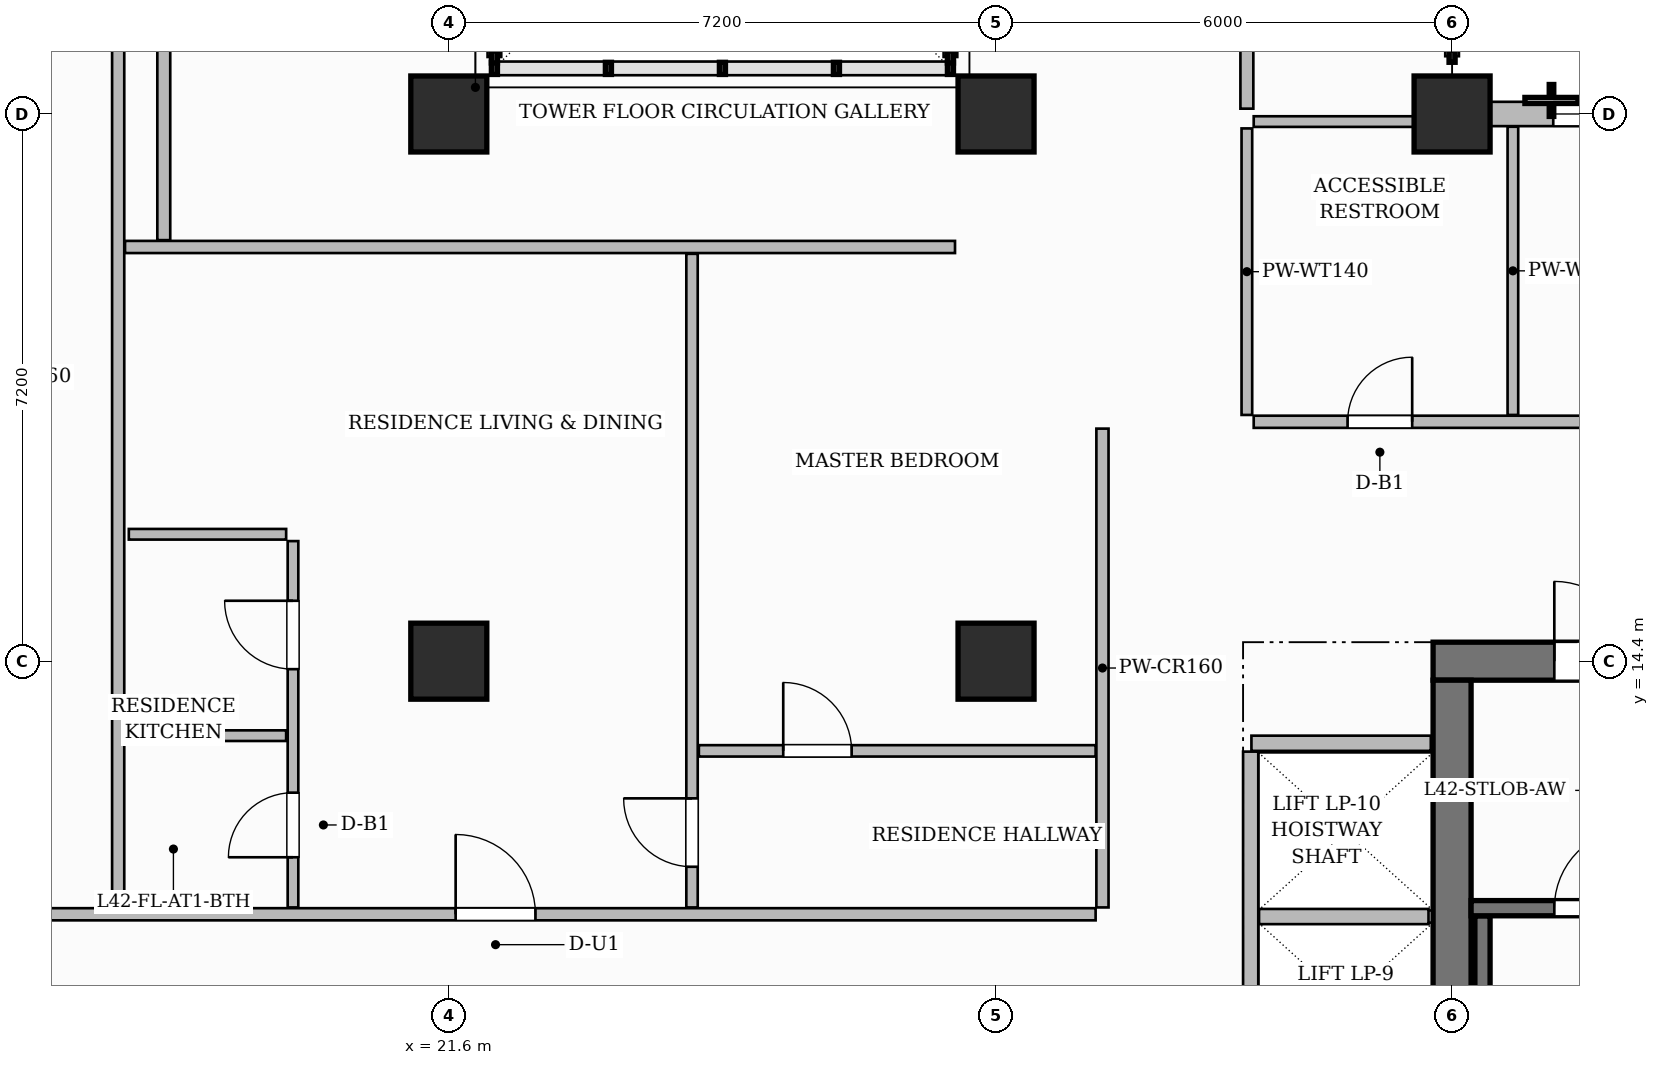
"""IFC4 building model, lengths in metres.
Left out: names, types, materials, properties, quantities, classifications, styles, units other than length and angle.
Written with IfcOpenShell. Run it as: python <this file> out.ifc"""

import sys

from ifc_helpers import new_model, si_unit, direction, frame, frame_2d, origin, origin_2d, place, context, subcontext, project, spatial, rectangle, extrude, source, transform, mapped, element, fill, save


model = new_model("IFC4")
c1 = context("Model", 3, precision=1e-05, world=origin(), true_north=direction((0.0, 1.0)))
c2 = subcontext(c1, "Body", "Model", "MODEL_VIEW")
j1 = project(units=[si_unit("LENGTHUNIT", "METRE"), si_unit("PLANEANGLEUNIT", "RADIAN")], contexts=[c1])
p1 = place(None, origin())
s1 = spatial("IfcSite", under=j1, at=p1, CompositionType="ELEMENT")
p2 = place(p1, origin())
s2 = spatial("IfcBuilding", under=s1, at=p2, CompositionType="ELEMENT")
p3 = place(p2, frame((0.0, 0.0, 169.55)))
s3 = spatial("IfcBuildingStorey", under=s2, at=p3, CompositionType="ELEMENT", Elevation=169.55)
p4 = place(p3, frame((34.55, 14.4, 0.0), z_axis=(0.0, 0.0, 1.0), x_axis=(1.0, 0.0, 0.0)))
e1 = element("IfcWall", 1, at=p4, inside=s3, PredefinedType="SHEAR", context=c2, shape_type="SweptSolid", body=[
    extrude(rectangle(XDim=15.5, YDim=0.5, at=frame_2d((7.75, 0.0))), origin(), (0.0, 0.0, 1.0), 3.85),
])
p5 = place(p4, frame((5.38, 0.0, 0.0)))
e2 = element("IfcOpeningElement", 2, at=p5, cuts=e1, PredefinedType="OPENING", context=c2, shape_type="SweptSolid", body=[
    extrude(rectangle(XDim=1.5, YDim=2.2, at=frame_2d((0.75, 1.1))), frame((0.0, 0.26, 0.0), z_axis=(0.0, -1.0, 0.0), x_axis=(1.0, 0.0, 0.0)), (0.0, 0.0, 1.0), 0.52),
])
p6 = place(p4, frame((1.595, 0.0, 0.0)))
e3 = element("IfcOpeningElement", 3, at=p6, cuts=e1, PredefinedType="OPENING", context=c2, shape_type="SweptSolid", body=[
    extrude(rectangle(XDim=1.05, YDim=2.15, at=frame_2d((0.525, 1.075))), frame((0.0, 0.26, 0.0), z_axis=(0.0, -1.0, 0.0), x_axis=(1.0, 0.0, 0.0)), (0.0, 0.0, 1.0), 0.52),
])
p7 = place(p4, frame((11.225, 0.0, 0.0)))
e4 = element("IfcOpeningElement", 4, at=p7, cuts=e1, PredefinedType="OPENING", context=c2, shape_type="SweptSolid", body=[
    extrude(rectangle(XDim=1.05, YDim=2.15, at=frame_2d((0.525, 1.075))), frame((0.0, 0.26, 0.0), z_axis=(0.0, -1.0, 0.0), x_axis=(1.0, 0.0, 0.0)), (0.0, 0.0, 1.0), 0.52),
])
p8 = place(p3, frame((34.8, 3.85, 0.0), z_axis=(0.0, 0.0, 1.0), x_axis=(0.0, 1.0, 0.0)))
e5 = element("IfcWall", 5, at=p8, inside=s3, PredefinedType="SHEAR", context=c2, shape_type="SweptSolid", body=[
    extrude(rectangle(XDim=10.3, YDim=0.5, at=frame_2d((5.15, 0.0))), origin(), (0.0, 0.0, 1.0), 3.85),
])
m1 = source(origin(), c2, "Body", "SweptSolid", [
    extrude(rectangle(XDim=1.0, YDim=1.0, at=origin_2d()), origin(), (0.0, 0.0, 1.0), 3.85),
])
for number, where, z_axis, x_axis in (
    (6, (21.6, 14.4, 0.0), (0.0, 0.0, 1.0), (1.0, 0.0, 0.0)),
    (7, (21.6, 21.6, 0.0), (0.0, 0.0, 1.0), (1.0, 0.0, 0.0)),
    (8, (28.8, 14.4, 0.0), (0.0, 0.0, 1.0), (1.0, 0.0, 0.0)),
    (9, (28.8, 21.6, 0.0), (0.0, 0.0, 1.0), (1.0, 0.0, 0.0)),
    (10, (34.8, 21.6, 0.0), (0.0, 0.0, 1.0), (1.0, 0.0, 0.0)),
):
    element("IfcColumn", number, at=place(p3, frame(where, z_axis=z_axis, x_axis=x_axis)), inside=s3, PredefinedType="COLUMN", context=c2, shape_type="MappedRepresentation", body=[
        mapped(m1, transform((0.0, 0.0, 0.0), scale=1.0)),
    ])
p9 = place(p3, frame((35.2, 4.1, 0.0), z_axis=(0.0, 0.0, 1.0), x_axis=(0.0, 1.0, 0.0)))
e11 = element("IfcWall", 11, at=p9, inside=s3, PredefinedType="SHEAR", context=c2, shape_type="SweptSolid", body=[
    extrude(rectangle(XDim=6.95, YDim=0.2, at=frame_2d((3.475, 0.0))), origin(), (0.0, 0.0, 1.0), 3.85),
])
p10 = place(p3, frame((35.05, 11.15, 0.0), z_axis=(0.0, 0.0, 1.0), x_axis=(1.0, 0.0, 0.0)))
e12 = element("IfcWall", 12, at=p10, inside=s3, PredefinedType="SHEAR", context=c2, shape_type="SweptSolid", body=[
    extrude(rectangle(XDim=3.19, YDim=0.2, at=frame_2d((1.595, 0.0))), origin(), (0.0, 0.0, 1.0), 3.85),
])
p11 = place(p10, frame((1.095, 0.0, 0.0)))
e13 = element("IfcOpeningElement", 13, at=p11, cuts=e12, PredefinedType="OPENING", context=c2, shape_type="SweptSolid", body=[
    extrude(rectangle(XDim=1.05, YDim=2.2, at=frame_2d((0.525, 1.1))), frame((0.0, 0.11, 0.0), z_axis=(0.0, -1.0, 0.0), x_axis=(1.0, 0.0, 0.0)), (0.0, 0.0, 1.0), 0.22),
])
p12 = place(p3, frame((32.16, 13.32, 0.0), z_axis=(0.0, 0.0, 1.0), x_axis=(1.0, 0.0, 0.0)))
e14 = element("IfcWall", 14, at=p12, inside=s3, PredefinedType="PARTITIONING", context=c2, shape_type="SweptSolid", body=[
    extrude(rectangle(XDim=2.36, YDim=0.2, at=frame_2d((1.18, 0.0))), origin(), (0.0, 0.0, 1.0), 3.6),
])
p13 = place(p3, frame((32.15, 4.39, 0.0), z_axis=(0.0, 0.0, 1.0), x_axis=(0.0, 1.0, 0.0)))
e15 = element("IfcWall", 15, at=p13, inside=s3, PredefinedType="PARTITIONING", context=c2, shape_type="SweptSolid", body=[
    extrude(rectangle(XDim=8.82, YDim=0.2, at=frame_2d((4.41, 0.0))), origin(), (0.0, 0.0, 1.0), 3.6),
])
p14 = place(p3, frame((32.26, 11.04, 0.0), z_axis=(0.0, 0.0, 1.0), x_axis=(1.0, 0.0, 0.0)))
e16 = element("IfcWall", 16, at=p14, inside=s3, PredefinedType="PARTITIONING", context=c2, shape_type="SweptSolid", body=[
    extrude(rectangle(XDim=2.23, YDim=0.2, at=frame_2d((1.115, 0.0))), origin(), (0.0, 0.0, 1.0), 3.6),
])
p15 = place(p3, frame((14.568, 11.07, 0.0), z_axis=(0.0, 0.0, 1.0), x_axis=(1.0, 0.0, 0.0)))
e17 = element("IfcWall", 17, at=p15, inside=s3, PredefinedType="PARTITIONING", context=c2, shape_type="SweptSolid", body=[
    extrude(rectangle(XDim=15.542, YDim=0.16, at=frame_2d((7.771, 0.0))), origin(), (0.0, 0.0, 1.0), 3.6),
])
p16 = place(p15, frame((7.122, 0.0, 0.0)))
e18 = element("IfcOpeningElement", 18, at=p16, cuts=e17, PredefinedType="OPENING", context=c2, shape_type="SweptSolid", body=[
    extrude(rectangle(XDim=1.05, YDim=2.25, at=frame_2d((0.525, 1.125))), frame((0.0, 0.09, 0.0), z_axis=(0.0, -1.0, 0.0), x_axis=(1.0, 0.0, 0.0)), (0.0, 0.0, 1.0), 0.18),
])
p17 = place(p3, frame((30.2, 11.16, 0.0), z_axis=(0.0, 0.0, 1.0), x_axis=(0.0, 1.0, 0.0)))
e19 = element("IfcWall", 19, at=p17, inside=s3, PredefinedType="PARTITIONING", context=c2, shape_type="SweptSolid", body=[
    extrude(rectangle(XDim=6.3, YDim=0.16, at=frame_2d((3.15, 0.0))), origin(), (0.0, 0.0, 1.0), 3.6),
])
p18 = place(p3, frame((32.19, 17.55, 0.0), z_axis=(0.0, 0.0, 1.0), x_axis=(1.0, 0.0, 0.0)))
e20 = element("IfcWall", 20, at=p18, inside=s3, PredefinedType="PARTITIONING", context=c2, shape_type="SweptSolid", body=[
    extrude(rectangle(XDim=17.47, YDim=0.16, at=frame_2d((8.735, 0.0))), origin(), (0.0, 0.0, 1.0), 3.6),
])
p19 = place(p18, frame((1.235, 0.0, 0.0)))
e21 = element("IfcOpeningElement", 21, at=p19, cuts=e20, PredefinedType="OPENING", context=c2, shape_type="SweptSolid", body=[
    extrude(rectangle(XDim=0.85, YDim=2.1, at=frame_2d((0.425, 1.05))), frame((0.0, 0.09, 0.0), z_axis=(0.0, -1.0, 0.0), x_axis=(1.0, 0.0, 0.0)), (0.0, 0.0, 1.0), 0.18),
])
p20 = place(p18, frame((6.61, 0.0, 0.0)))
e22 = element("IfcOpeningElement", 22, at=p20, cuts=e20, PredefinedType="OPENING", context=c2, shape_type="SweptSolid", body=[
    extrude(rectangle(XDim=1.4, YDim=2.35, at=frame_2d((0.7, 1.175))), frame((0.0, 0.09, 0.0), z_axis=(0.0, -1.0, 0.0), x_axis=(1.0, 0.0, 0.0)), (0.0, 0.0, 1.0), 0.18),
])
p21 = place(p18, frame((13.885, 0.0, 0.0)))
e23 = element("IfcOpeningElement", 23, at=p21, cuts=e20, PredefinedType="OPENING", context=c2, shape_type="SweptSolid", body=[
    extrude(rectangle(XDim=0.95, YDim=2.15, at=frame_2d((0.475, 1.075))), frame((0.0, 0.09, 0.0), z_axis=(0.0, -1.0, 0.0), x_axis=(1.0, 0.0, 0.0)), (0.0, 0.0, 1.0), 0.18),
])
p22 = place(p3, frame((32.1, 17.64, 0.0), z_axis=(0.0, 0.0, 1.0), x_axis=(0.0, 1.0, 0.0)))
e24 = element("IfcWall", 24, at=p22, inside=s3, PredefinedType="PARTITIONING", context=c2, shape_type="SweptSolid", body=[
    extrude(rectangle(XDim=3.77, YDim=0.14, at=frame_2d((1.885, 0.0))), origin(), (0.0, 0.0, 1.0), 3.6),
])
p23 = place(p3, frame((35.6, 17.64, 0.0), z_axis=(0.0, 0.0, 1.0), x_axis=(0.0, 1.0, 0.0)))
e25 = element("IfcWall", 25, at=p23, inside=s3, PredefinedType="PARTITIONING", context=c2, shape_type="SweptSolid", body=[
    extrude(rectangle(XDim=3.792, YDim=0.14, at=frame_2d((1.896, 0.0))), origin(), (0.0, 0.0, 1.0), 3.6),
])
p24 = place(p3, frame((17.25, 11.16, 0.0), z_axis=(0.0, 0.0, 1.0), x_axis=(0.0, 1.0, 0.0)))
e26 = element("IfcWall", 26, at=p24, inside=s3, PredefinedType="PARTITIONING", context=c2, shape_type="SweptSolid", body=[
    extrude(rectangle(XDim=13.95, YDim=0.16, at=frame_2d((6.975, 0.0))), origin(), (0.0, 0.0, 1.0), 3.6),
])
p25 = place(p3, frame((17.85, 19.94, 0.0), z_axis=(0.0, 0.0, 1.0), x_axis=(0.0, 1.0, 0.0)))
e27 = element("IfcWall", 27, at=p25, inside=s3, PredefinedType="PARTITIONING", context=c2, shape_type="SweptSolid", body=[
    extrude(rectangle(XDim=5.22, YDim=0.17, at=frame_2d((2.61, 0.0))), origin(), (0.0, 0.0, 1.0), 3.285),
])
p26 = place(p3, frame((17.34, 19.85, 0.0), z_axis=(0.0, 0.0, 1.0), x_axis=(1.0, 0.0, 0.0)))
e28 = element("IfcWall", 28, at=p26, inside=s3, PredefinedType="PARTITIONING", context=c2, shape_type="SweptSolid", body=[
    extrude(rectangle(XDim=10.92, YDim=0.16, at=frame_2d((5.46, 0.0))), origin(), (0.0, 0.0, 1.0), 3.6),
])
p27 = place(p3, frame((32.19, 21.5, 0.0), z_axis=(0.0, 0.0, 1.0), x_axis=(1.0, 0.0, 0.0)))
e29 = element("IfcWall", 29, at=p27, inside=s3, PredefinedType="PARTITIONING", context=c2, shape_type="SweptSolid", body=[
    extrude(rectangle(XDim=2.42, YDim=0.14, at=frame_2d((1.21, 0.0))), origin(), (0.0, 0.0, 1.0), 3.085),
])
p28 = place(p3, frame((32.1, 21.67, 0.0), z_axis=(0.0, 0.0, 1.0), x_axis=(0.0, 1.0, 0.0)))
e30 = element("IfcWall", 30, at=p28, inside=s3, PredefinedType="PARTITIONING", context=c2, shape_type="SweptSolid", body=[
    extrude(rectangle(XDim=10.702, YDim=0.17, at=frame_2d((5.351, 0.0))), origin(), (0.0, 0.0, 1.0), 3.6),
])
p29 = place(p28, frame((4.43, 0.0, 0.0)))
e31 = element("IfcOpeningElement", 31, at=p29, cuts=e30, PredefinedType="OPENING", context=c2, shape_type="SweptSolid", body=[
    extrude(rectangle(XDim=1.4, YDim=2.35, at=frame_2d((0.7, 1.175))), frame((0.0, 0.095, 0.0), z_axis=(0.0, -1.0, 0.0), x_axis=(1.0, 0.0, 0.0)), (0.0, 0.0, 1.0), 0.19),
])
p30 = place(p3, frame((19.55, 11.16, 0.0), z_axis=(0.0, 0.0, 1.0), x_axis=(0.0, 1.0, 0.0)))
e32 = element("IfcWall", 32, at=p30, inside=s3, PredefinedType="PARTITIONING", context=c2, shape_type="SweptSolid", body=[
    extrude(rectangle(XDim=4.82, YDim=0.14, at=frame_2d((2.41, 0.0))), origin(), (0.0, 0.0, 1.0), 3.6),
])
p31 = place(p30, frame((0.66, 0.0, 0.0)))
e33 = element("IfcOpeningElement", 33, at=p31, cuts=e32, PredefinedType="OPENING", context=c2, shape_type="SweptSolid", body=[
    extrude(rectangle(XDim=0.85, YDim=2.1, at=frame_2d((0.425, 1.05))), frame((0.0, 0.08, 0.0), z_axis=(0.0, -1.0, 0.0), x_axis=(1.0, 0.0, 0.0)), (0.0, 0.0, 1.0), 0.16),
])
p32 = place(p30, frame((3.135, 0.0, 0.0)))
e34 = element("IfcOpeningElement", 34, at=p32, cuts=e32, PredefinedType="OPENING", context=c2, shape_type="SweptSolid", body=[
    extrude(rectangle(XDim=0.9, YDim=2.15, at=frame_2d((0.45, 1.075))), frame((0.0, 0.08, 0.0), z_axis=(0.0, -1.0, 0.0), x_axis=(1.0, 0.0, 0.0)), (0.0, 0.0, 1.0), 0.16),
])
for number, where, z_axis, x_axis in (
    (35, (17.39, 13.42, 0.0), (0.0, 0.0, 1.0), (1.0, 0.0, 0.0)),
    (36, (17.39, 16.07, 0.0), (0.0, 0.0, 1.0), (1.0, 0.0, 0.0)),
):
    element("IfcWall", number, at=place(p3, frame(where, z_axis=z_axis, x_axis=x_axis)), inside=s3, PredefinedType="PARTITIONING", context=c2, shape_type="SweptSolid", body=[
        extrude(rectangle(XDim=2.07, YDim=0.14, at=frame_2d((1.035, 0.0))), origin(), (0.0, 0.0, 1.0), 3.6),
    ])
p33 = place(p3, frame((24.8, 11.16, 0.0), z_axis=(0.0, 0.0, 1.0), x_axis=(0.0, 1.0, 0.0)))
e37 = element("IfcWall", 37, at=p33, inside=s3, PredefinedType="PARTITIONING", context=c2, shape_type="SweptSolid", body=[
    extrude(rectangle(XDim=8.6, YDim=0.15, at=frame_2d((4.3, 0.0))), origin(), (0.0, 0.0, 1.0), 3.6),
])
p34 = place(p33, frame((0.535, 0.0, 0.0)))
e38 = element("IfcOpeningElement", 38, at=p34, cuts=e37, PredefinedType="OPENING", context=c2, shape_type="SweptSolid", body=[
    extrude(rectangle(XDim=0.9, YDim=2.15, at=frame_2d((0.45, 1.075))), frame((0.0, 0.085, 0.0), z_axis=(0.0, -1.0, 0.0), x_axis=(1.0, 0.0, 0.0)), (0.0, 0.0, 1.0), 0.17),
])
p35 = place(p3, frame((24.89, 13.22, 0.0), z_axis=(0.0, 0.0, 1.0), x_axis=(1.0, 0.0, 0.0)))
e39 = element("IfcWall", 39, at=p35, inside=s3, PredefinedType="PARTITIONING", context=c2, shape_type="SweptSolid", body=[
    extrude(rectangle(XDim=5.22, YDim=0.15, at=frame_2d((2.61, 0.0))), origin(), (0.0, 0.0, 1.0), 3.6),
])
p36 = place(p35, frame((1.11, 0.0, 0.0)))
e40 = element("IfcOpeningElement", 40, at=p36, cuts=e39, PredefinedType="OPENING", context=c2, shape_type="SweptSolid", body=[
    extrude(rectangle(XDim=0.9, YDim=2.15, at=frame_2d((0.45, 1.075))), frame((0.0, 0.085, 0.0), z_axis=(0.0, -1.0, 0.0), x_axis=(1.0, 0.0, 0.0)), (0.0, 0.0, 1.0), 0.17),
])
p37 = place(p3, frame((34.8, 21.6, 0.0), z_axis=(0.0, 0.0, 1.0), x_axis=(1.0, 0.0, 0.0)))
e41 = element("IfcWall", 41, at=p37, inside=s3, PredefinedType="SOLIDWALL", context=c2, shape_type="SweptSolid", body=[
    extrude(rectangle(XDim=15.0, YDim=0.32, at=frame_2d((7.5, 0.0))), origin(), (0.0, 0.0, 1.0), 3.085),
])
p38 = place(p37, frame((1.331, 0.0, 0.8)))
e42 = element("IfcOpeningElement", 42, at=p38, cuts=e41, PredefinedType="OPENING", context=c2, shape_type="SweptSolid", body=[
    extrude(rectangle(XDim=1.8, YDim=1.85, at=frame_2d((0.9, 0.925))), frame((0.0, 0.17, 0.0), z_axis=(0.0, -1.0, 0.0), x_axis=(1.0, 0.0, 0.0)), (0.0, 0.0, 1.0), 0.34),
])
p39 = place(p37, frame((4.077, 0.0, 0.8)))
e43 = element("IfcOpeningElement", 43, at=p39, cuts=e41, PredefinedType="OPENING", context=c2, shape_type="SweptSolid", body=[
    extrude(rectangle(XDim=1.8, YDim=1.85, at=frame_2d((0.9, 0.925))), frame((0.0, 0.17, 0.0), z_axis=(0.0, -1.0, 0.0), x_axis=(1.0, 0.0, 0.0)), (0.0, 0.0, 1.0), 0.34),
])
p40 = place(p37, frame((9.131, 0.0, 0.8)))
e44 = element("IfcOpeningElement", 44, at=p40, cuts=e41, PredefinedType="OPENING", context=c2, shape_type="SweptSolid", body=[
    extrude(rectangle(XDim=1.8, YDim=1.85, at=frame_2d((0.9, 0.925))), frame((0.0, 0.17, 0.0), z_axis=(0.0, -1.0, 0.0), x_axis=(1.0, 0.0, 0.0)), (0.0, 0.0, 1.0), 0.34),
])
p41 = place(p37, frame((11.877, 0.0, 0.8)))
e45 = element("IfcOpeningElement", 45, at=p41, cuts=e41, PredefinedType="OPENING", context=c2, shape_type="SweptSolid", body=[
    extrude(rectangle(XDim=1.8, YDim=1.85, at=frame_2d((0.9, 0.925))), frame((0.0, 0.17, 0.0), z_axis=(0.0, -1.0, 0.0), x_axis=(1.0, 0.0, 0.0)), (0.0, 0.0, 1.0), 0.34),
])
m2 = source(origin(), c2, "Body", "SweptSolid", [
    extrude(rectangle(XDim=1.05, YDim=2.2, at=frame_2d((0.525, 1.1))), frame((0.0, 0.025, 0.0), z_axis=(0.0, -1.0, 0.0), x_axis=(1.0, 0.0, 0.0)), (0.0, 0.0, 1.0), 0.05),
])
p42 = place(p11, origin())
e46 = element("IfcDoor", 46, at=p42, inside=s3, OperationType="SINGLE_SWING_RIGHT", PredefinedType="DOOR", context=c2, shape_type="MappedRepresentation", body=[
    mapped(m2, transform((0.0, 0.0, 0.0), scale=1.0)),
])
fill(e13, e46)
m3 = source(origin(), c2, "Body", "SweptSolid", [
    extrude(rectangle(XDim=1.05, YDim=2.15, at=frame_2d((0.525, 1.075))), frame((0.0, 0.025, 0.0), z_axis=(0.0, -1.0, 0.0), x_axis=(1.0, 0.0, 0.0)), (0.0, 0.0, 1.0), 0.05),
])
p43 = place(p6, origin())
e47 = element("IfcDoor", 47, at=p43, inside=s3, OperationType="SINGLE_SWING_LEFT", PredefinedType="DOOR", context=c2, shape_type="MappedRepresentation", body=[
    mapped(m3, transform((0.0, 0.0, 0.0), scale=1.0)),
])
fill(e3, e47)
m4 = source(origin(), c2, "Body", "SweptSolid", [
    extrude(rectangle(XDim=0.85, YDim=2.1, at=frame_2d((0.425, 1.05))), frame((0.0, 0.025, 0.0), z_axis=(0.0, -1.0, 0.0), x_axis=(1.0, 0.0, 0.0)), (0.0, 0.0, 1.0), 0.05),
])
p44 = place(p19, origin())
e48 = element("IfcDoor", 48, at=p44, inside=s3, OperationType="SINGLE_SWING_RIGHT", PredefinedType="DOOR", context=c2, shape_type="MappedRepresentation", body=[
    mapped(m4, transform((0.0, 0.0, 0.0), scale=1.0)),
])
fill(e21, e48)
p45 = place(p31, origin())
e49 = element("IfcDoor", 49, at=p45, inside=s3, OperationType="SINGLE_SWING_LEFT", PredefinedType="DOOR", context=c2, shape_type="MappedRepresentation", body=[
    mapped(m4, transform((0.0, 0.0, 0.0), scale=1.0)),
])
fill(e33, e49)
m5 = source(origin(), c2, "Body", "SweptSolid", [
    extrude(rectangle(XDim=0.9, YDim=2.15, at=frame_2d((0.45, 1.075))), frame((0.0, 0.025, 0.0), z_axis=(0.0, -1.0, 0.0), x_axis=(1.0, 0.0, 0.0)), (0.0, 0.0, 1.0), 0.05),
])
p46 = place(p32, origin())
e50 = element("IfcDoor", 50, at=p46, inside=s3, OperationType="SINGLE_SWING_RIGHT", PredefinedType="DOOR", context=c2, shape_type="MappedRepresentation", body=[
    mapped(m5, transform((0.0, 0.0, 0.0), scale=1.0)),
])
fill(e34, e50)
m6 = source(origin(), c2, "Body", "SweptSolid", [
    extrude(rectangle(XDim=1.05, YDim=2.25, at=frame_2d((0.525, 1.125))), frame((0.0, 0.025, 0.0), z_axis=(0.0, -1.0, 0.0), x_axis=(1.0, 0.0, 0.0)), (0.0, 0.0, 1.0), 0.05),
])
p47 = place(p16, origin())
e51 = element("IfcDoor", 51, at=p47, inside=s3, OperationType="SINGLE_SWING_LEFT", PredefinedType="DOOR", context=c2, shape_type="MappedRepresentation", body=[
    mapped(m6, transform((0.0, 0.0, 0.0), scale=1.0)),
])
fill(e18, e51)
p48 = place(p34, origin())
e52 = element("IfcDoor", 52, at=p48, inside=s3, OperationType="SINGLE_SWING_RIGHT", PredefinedType="DOOR", context=c2, shape_type="MappedRepresentation", body=[
    mapped(m5, transform((0.0, 0.0, 0.0), scale=1.0)),
])
fill(e38, e52)
p49 = place(p36, origin())
e53 = element("IfcDoor", 53, at=p49, inside=s3, OperationType="SINGLE_SWING_LEFT", PredefinedType="DOOR", context=c2, shape_type="MappedRepresentation", body=[
    mapped(m5, transform((0.0, 0.0, 0.0), scale=1.0)),
])
fill(e40, e53)
m7 = source(origin(), c2, "Body", "SweptSolid", [
    extrude(rectangle(XDim=1.8, YDim=1.85, at=frame_2d((0.9, 0.925))), frame((0.0, 0.03, 0.0), z_axis=(0.0, -1.0, 0.0), x_axis=(1.0, 0.0, 0.0)), (0.0, 0.0, 1.0), 0.06),
])
p50 = place(p38, origin())
e54 = element("IfcWindow", 54, at=p50, inside=s3, PartitioningType="DOUBLE_PANEL_VERTICAL", PredefinedType="WINDOW", context=c2, shape_type="MappedRepresentation", body=[
    mapped(m7, transform((0.0, 0.0, 0.0), scale=1.0)),
])
fill(e42, e54)
save(model, sys.argv[1])
